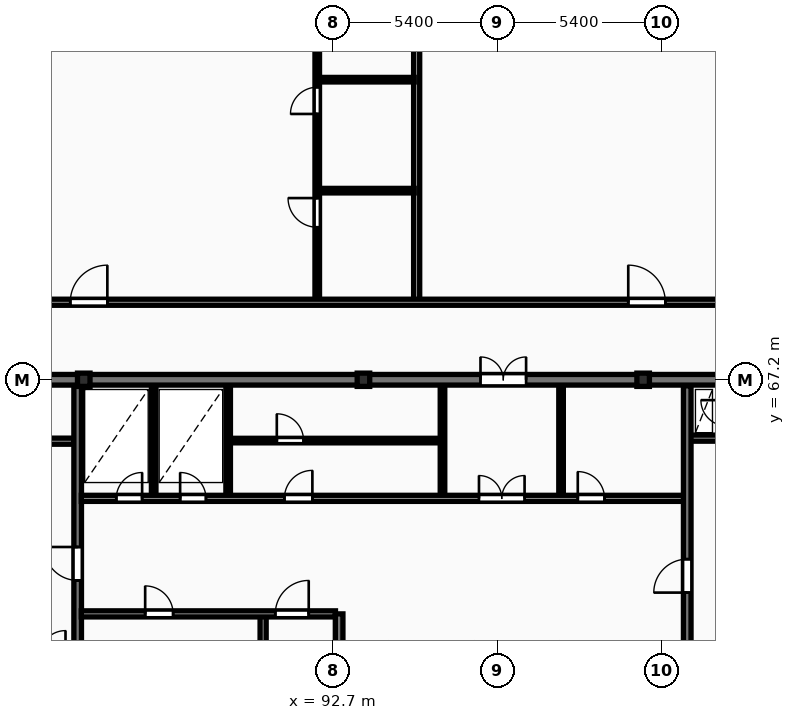
"""IFC4 building model, lengths in metres.
Left out: names, types, materials, properties, quantities, classifications, styles, units other than length and angle.
Written with IfcOpenShell. Run it as: python <this file> out.ifc"""

import sys

from ifc_helpers import new_model, si_unit, direction, frame, frame_2d, origin, origin_2d, place, context, subcontext, project, spatial, rectangle, i_section, extrude, element, fill, save


model = new_model("IFC4")
c1 = context("Model", 3, precision=1e-05, world=origin(), true_north=direction((0.0, 1.0)))
c2 = subcontext(c1, "Body", "Model", "MODEL_VIEW")
j1 = project(units=[si_unit("LENGTHUNIT", "METRE"), si_unit("PLANEANGLEUNIT", "RADIAN")], contexts=[c1])
p1 = place(None, origin())
s1 = spatial("IfcSite", under=j1, at=p1, CompositionType="ELEMENT")
p2 = place(p1, origin())
s2 = spatial("IfcBuilding", under=s1, at=p2, CompositionType="ELEMENT")
p3 = place(p2, frame((0.0, 0.0, 153.7)))
s3 = spatial("IfcBuildingStorey", under=s2, at=p3, CompositionType="ELEMENT", Elevation=153.7)
for number, where, z_axis, x_axis in (
    (1, (84.5, 67.2, 0.0), (0.0, 0.0, 1.0), (1.0, 0.0, 0.0)),
    (2, (93.7, 67.2, 0.0), (0.0, 0.0, 1.0), (1.0, 0.0, 0.0)),
    (3, (102.9, 67.2, 0.0), (0.0, 0.0, 1.0), (1.0, 0.0, 0.0)),
):
    element("IfcColumn", number, at=place(p3, frame(where, z_axis=z_axis, x_axis=x_axis)), inside=s3, PredefinedType="COLUMN", context=c2, shape_type="SweptSolid", body=[
        extrude(i_section(OverallWidth=0.412, OverallDepth=0.437, WebThickness=0.036, FlangeThickness=0.052, FilletRadius=0.015, at=origin_2d()), origin(), (0.0, 0.0, 1.0), 3.6),
    ])
p4 = place(p3, frame((75.95, 67.2, 0.0), z_axis=(0.0, 0.0, 1.0), x_axis=(1.0, 0.0, 0.0)))
e4 = element("IfcWall", 4, at=p4, inside=s3, PredefinedType="SHEAR", context=c2, shape_type="SweptSolid", body=[
    extrude(rectangle(XDim=36.3, YDim=0.35, at=frame_2d((18.15, 0.0))), origin(), (0.0, 0.0, 1.0), 3.6),
])
p5 = place(p4, frame((5.25, 0.0, 0.0)))
e5 = element("IfcOpeningElement", 5, at=p5, cuts=e4, PredefinedType="OPENING", context=c2, shape_type="SweptSolid", body=[
    extrude(rectangle(XDim=1.0, YDim=2.15, at=frame_2d((0.5, 1.075))), frame((0.0, 0.185, 0.0), z_axis=(0.0, -1.0, 0.0), x_axis=(1.0, 0.0, 0.0)), (0.0, 0.0, 1.0), 0.37),
])
p6 = place(p4, frame((21.6, 0.0, 0.0)))
e6 = element("IfcOpeningElement", 6, at=p6, cuts=e4, PredefinedType="OPENING", context=c2, shape_type="SweptSolid", body=[
    extrude(rectangle(XDim=1.5, YDim=2.2, at=frame_2d((0.75, 1.1))), frame((0.0, 0.185, 0.0), z_axis=(0.0, -1.0, 0.0), x_axis=(1.0, 0.0, 0.0)), (0.0, 0.0, 1.0), 0.37),
])
p7 = place(p4, frame((30.45, 0.0, 0.0)))
e7 = element("IfcOpeningElement", 7, at=p7, cuts=e4, PredefinedType="OPENING", context=c2, shape_type="SweptSolid", body=[
    extrude(rectangle(XDim=1.0, YDim=2.15, at=frame_2d((0.5, 1.075))), frame((0.0, 0.185, 0.0), z_axis=(0.0, -1.0, 0.0), x_axis=(1.0, 0.0, 0.0)), (0.0, 0.0, 1.0), 0.37),
])
p8 = place(p3, frame((79.79, 65.18, 0.0), z_axis=(0.0, 0.0, 1.0), x_axis=(1.0, 0.0, 0.0)))
e8 = element("IfcWall", 8, at=p8, inside=s3, PredefinedType="PARTITIONING", context=c2, shape_type="SweptSolid", body=[
    extrude(rectangle(XDim=4.39, YDim=0.2, at=frame_2d((2.195, 0.0))), origin(), (0.0, 0.0, 1.0), 3.32),
])
p9 = place(p8, frame((1.5, 0.0, 0.0)))
e9 = element("IfcOpeningElement", 9, at=p9, cuts=e8, PredefinedType="OPENING", context=c2, shape_type="SweptSolid", body=[
    extrude(rectangle(XDim=1.1, YDim=2.1, at=frame_2d((0.55, 1.05))), frame((0.0, 0.11, 0.0), z_axis=(0.0, -1.0, 0.0), x_axis=(1.0, 0.0, 0.0)), (0.0, 0.0, 1.0), 0.22),
])
p10 = place(p3, frame((84.3, 55.4, 0.0), z_axis=(0.0, 0.0, 1.0), x_axis=(0.0, 1.0, 0.0)))
e10 = element("IfcWall", 10, at=p10, inside=s3, PredefinedType="SHEAR", context=c2, shape_type="SweptSolid", body=[
    extrude(rectangle(XDim=11.6, YDim=0.25, at=frame_2d((5.8, 0.0))), origin(), (0.0, 0.0, 1.0), 3.6),
])
p11 = place(p10, frame((5.2, 0.0, 0.0)))
e11 = element("IfcOpeningElement", 11, at=p11, cuts=e10, PredefinedType="OPENING", context=c2, shape_type="SweptSolid", body=[
    extrude(rectangle(XDim=1.1, YDim=2.1, at=frame_2d((0.55, 1.05))), frame((0.0, 0.135, 0.0), z_axis=(0.0, -1.0, 0.0), x_axis=(1.0, 0.0, 0.0)), (0.0, 0.0, 1.0), 0.27),
])
p12 = place(p3, frame((90.4, 55.4, 0.0), z_axis=(0.0, 0.0, 1.0), x_axis=(0.0, 1.0, 0.0)))
e12 = element("IfcWall", 12, at=p12, inside=s3, PredefinedType="PARTITIONING", context=c2, shape_type="SweptSolid", body=[
    extrude(rectangle(XDim=4.1, YDim=0.2, at=frame_2d((2.05, 0.0))), origin(), (0.0, 0.0, 1.0), 3.32),
])
p13 = place(p3, frame((84.42, 59.5, 0.0), z_axis=(0.0, 0.0, 1.0), x_axis=(1.0, 0.0, 0.0)))
e13 = element("IfcWall", 13, at=p13, inside=s3, PredefinedType="PARTITIONING", context=c2, shape_type="SweptSolid", body=[
    extrude(rectangle(XDim=8.36, YDim=0.2, at=frame_2d((4.18, 0.0))), origin(), (0.0, 0.0, 1.0), 3.32),
])
p14 = place(p13, frame((2.1, 0.0, 0.0)))
e14 = element("IfcOpeningElement", 14, at=p14, cuts=e13, PredefinedType="OPENING", context=c2, shape_type="SweptSolid", body=[
    extrude(rectangle(XDim=0.92, YDim=2.08, at=frame_2d((0.46, 1.04))), frame((0.0, 0.11, 0.0), z_axis=(0.0, -1.0, 0.0), x_axis=(1.0, 0.0, 0.0)), (0.0, 0.0, 1.0), 0.22),
])
p15 = place(p13, frame((6.38, 0.0, 0.0)))
e15 = element("IfcOpeningElement", 15, at=p15, cuts=e13, PredefinedType="OPENING", context=c2, shape_type="SweptSolid", body=[
    extrude(rectangle(XDim=1.1, YDim=2.1, at=frame_2d((0.55, 1.05))), frame((0.0, 0.11, 0.0), z_axis=(0.0, -1.0, 0.0), x_axis=(1.0, 0.0, 0.0)), (0.0, 0.0, 1.0), 0.22),
])
p16 = place(p3, frame((92.9, 55.4, 0.0), z_axis=(0.0, 0.0, 1.0), x_axis=(0.0, 1.0, 0.0)))
e16 = element("IfcWall", 16, at=p16, inside=s3, PredefinedType="SHEAR", context=c2, shape_type="SweptSolid", body=[
    extrude(rectangle(XDim=4.1, YDim=0.25, at=frame_2d((2.05, 0.0))), origin(), (0.0, 0.0, 1.0), 3.6),
])
for number, where, z_axis, x_axis in (
    (17, (86.8, 63.4, 0.0), (0.0, 0.0, 1.0), (0.0, 1.0, 0.0)),
    (18, (89.25, 63.4, 0.0), (0.0, 0.0, 1.0), (0.0, 1.0, 0.0)),
):
    element("IfcWall", number, at=place(p3, frame(where, z_axis=z_axis, x_axis=x_axis)), inside=s3, PredefinedType="PARTITIONING", context=c2, shape_type="SweptSolid", body=[
        extrude(rectangle(XDim=3.6, YDim=0.15, at=frame_2d((1.8, 0.0))), origin(), (0.0, 0.0, 1.0), 3.32),
    ])
p17 = place(p3, frame((89.25, 65.2, 0.0), z_axis=(0.0, 0.0, 1.0), x_axis=(1.0, 0.0, 0.0)))
e19 = element("IfcWall", 19, at=p17, inside=s3, PredefinedType="PARTITIONING", context=c2, shape_type="SweptSolid", body=[
    extrude(rectangle(XDim=7.05, YDim=0.15, at=frame_2d((3.525, 0.0))), origin(), (0.0, 0.0, 1.0), 3.32),
])
p18 = place(p17, frame((1.6, 0.0, 0.0)))
e20 = element("IfcOpeningElement", 20, at=p18, cuts=e19, PredefinedType="OPENING", context=c2, shape_type="SweptSolid", body=[
    extrude(rectangle(XDim=0.88, YDim=2.06, at=frame_2d((0.44, 1.03))), frame((0.0, 0.085, 0.0), z_axis=(0.0, -1.0, 0.0), x_axis=(1.0, 0.0, 0.0)), (0.0, 0.0, 1.0), 0.17),
])
for number, where, z_axis, x_axis in (
    (21, (96.3, 63.4, 0.0), (0.0, 0.0, 1.0), (0.0, 1.0, 0.0)),
    (22, (100.2, 63.4, 0.0), (0.0, 0.0, 1.0), (0.0, 1.0, 0.0)),
):
    element("IfcWall", number, at=place(p3, frame(where, z_axis=z_axis, x_axis=x_axis)), inside=s3, PredefinedType="PARTITIONING", context=c2, shape_type="SweptSolid", body=[
        extrude(rectangle(XDim=3.6, YDim=0.15, at=frame_2d((1.8, 0.0))), origin(), (0.0, 0.0, 1.0), 3.32),
    ])
p19 = place(p3, frame((84.42, 63.3, 0.0), z_axis=(0.0, 0.0, 1.0), x_axis=(1.0, 0.0, 0.0)))
e23 = element("IfcWall", 23, at=p19, inside=s3, PredefinedType="PARTITIONING", context=c2, shape_type="SweptSolid", body=[
    extrude(rectangle(XDim=19.83, YDim=0.2, at=frame_2d((9.915, 0.0))), origin(), (0.0, 0.0, 1.0), 3.32),
])
p20 = place(p19, frame((1.15, 0.0, 0.0)))
e24 = element("IfcOpeningElement", 24, at=p20, cuts=e23, PredefinedType="OPENING", context=c2, shape_type="SweptSolid", body=[
    extrude(rectangle(XDim=0.85, YDim=2.05, at=frame_2d((0.425, 1.025))), frame((0.0, 0.11, 0.0), z_axis=(0.0, -1.0, 0.0), x_axis=(1.0, 0.0, 0.0)), (0.0, 0.0, 1.0), 0.22),
])
p21 = place(p19, frame((3.25, 0.0, 0.0)))
e25 = element("IfcOpeningElement", 25, at=p21, cuts=e23, PredefinedType="OPENING", context=c2, shape_type="SweptSolid", body=[
    extrude(rectangle(XDim=0.85, YDim=2.05, at=frame_2d((0.425, 1.025))), frame((0.0, 0.11, 0.0), z_axis=(0.0, -1.0, 0.0), x_axis=(1.0, 0.0, 0.0)), (0.0, 0.0, 1.0), 0.22),
])
p22 = place(p19, frame((13.08, 0.0, 0.0)))
e26 = element("IfcOpeningElement", 26, at=p22, cuts=e23, PredefinedType="OPENING", context=c2, shape_type="SweptSolid", body=[
    extrude(rectangle(XDim=1.5, YDim=2.2, at=frame_2d((0.75, 1.1))), frame((0.0, 0.11, 0.0), z_axis=(0.0, -1.0, 0.0), x_axis=(1.0, 0.0, 0.0)), (0.0, 0.0, 1.0), 0.22),
])
p23 = place(p19, frame((6.68, 0.0, 0.0)))
e27 = element("IfcOpeningElement", 27, at=p23, cuts=e23, PredefinedType="OPENING", context=c2, shape_type="SweptSolid", body=[
    extrude(rectangle(XDim=0.92, YDim=2.08, at=frame_2d((0.46, 1.04))), frame((0.0, 0.11, 0.0), z_axis=(0.0, -1.0, 0.0), x_axis=(1.0, 0.0, 0.0)), (0.0, 0.0, 1.0), 0.22),
])
p24 = place(p19, frame((16.33, 0.0, 0.0)))
e28 = element("IfcOpeningElement", 28, at=p24, cuts=e23, PredefinedType="OPENING", context=c2, shape_type="SweptSolid", body=[
    extrude(rectangle(XDim=0.88, YDim=2.06, at=frame_2d((0.44, 1.03))), frame((0.0, 0.11, 0.0), z_axis=(0.0, -1.0, 0.0), x_axis=(1.0, 0.0, 0.0)), (0.0, 0.0, 1.0), 0.22),
])
p25 = place(p3, frame((104.45, 65.28, 0.0), z_axis=(0.0, 0.0, 1.0), x_axis=(1.0, 0.0, 0.0)))
e29 = element("IfcWall", 29, at=p25, inside=s3, PredefinedType="PARTITIONING", context=c2, shape_type="SweptSolid", body=[
    extrude(rectangle(XDim=1.2, YDim=0.2, at=frame_2d((0.6, 0.0))), origin(), (0.0, 0.0, 1.0), 3.32),
])
p26 = place(p3, frame((104.35, 58.4, 0.0), z_axis=(0.0, 0.0, 1.0), x_axis=(0.0, 1.0, 0.0)))
e30 = element("IfcWall", 30, at=p26, inside=s3, PredefinedType="SHEAR", context=c2, shape_type="SweptSolid", body=[
    extrude(rectangle(XDim=8.6, YDim=0.25, at=frame_2d((4.3, 0.0))), origin(), (0.0, 0.0, 1.0), 3.6),
])
p27 = place(p26, frame((1.8, 0.0, 0.0)))
e31 = element("IfcOpeningElement", 31, at=p27, cuts=e30, PredefinedType="OPENING", context=c2, shape_type="SweptSolid", body=[
    extrude(rectangle(XDim=1.1, YDim=2.1, at=frame_2d((0.55, 1.05))), frame((0.0, 0.135, 0.0), z_axis=(0.0, -1.0, 0.0), x_axis=(1.0, 0.0, 0.0)), (0.0, 0.0, 1.0), 0.27),
])
p28 = place(p3, frame((95.45, 69.83, 0.0), z_axis=(0.0, 0.0, 1.0), x_axis=(0.0, 1.0, 0.0)))
e32 = element("IfcWall", 32, at=p28, inside=s3, PredefinedType="PARTITIONING", context=c2, shape_type="SweptSolid", body=[
    extrude(rectangle(XDim=26.07, YDim=0.2, at=frame_2d((13.035, 0.0))), origin(), (0.0, 0.0, 1.0), 3.32),
])
for number, where, z_axis, x_axis in (
    (33, (92.24, 73.42, 0.0), (0.0, 0.0, 1.0), (1.0, 0.0, 0.0)),
    (34, (92.24, 77.07, 0.0), (0.0, 0.0, 1.0), (1.0, 0.0, 0.0)),
):
    element("IfcWall", number, at=place(p3, frame(where, z_axis=z_axis, x_axis=x_axis)), inside=s3, PredefinedType="PARTITIONING", context=c2, shape_type="SweptSolid", body=[
        extrude(rectangle(XDim=3.13, YDim=0.15, at=frame_2d((1.565, 0.0))), origin(), (0.0, 0.0, 1.0), 3.32),
    ])
p29 = place(p3, frame((92.18, 69.81, 0.0), z_axis=(0.0, 0.0, 1.0), x_axis=(0.0, 1.0, 0.0)))
e35 = element("IfcWall", 35, at=p29, inside=s3, PredefinedType="PARTITIONING", context=c2, shape_type="SweptSolid", body=[
    extrude(rectangle(XDim=20.78, YDim=0.15, at=frame_2d((10.39, 0.0))), origin(), (0.0, 0.0, 1.0), 3.32),
])
p30 = place(p29, frame((2.406, 0.0, 0.0)))
e36 = element("IfcOpeningElement", 36, at=p30, cuts=e35, PredefinedType="OPENING", context=c2, shape_type="SweptSolid", body=[
    extrude(rectangle(XDim=0.96, YDim=2.1, at=frame_2d((0.48, 1.05))), frame((0.0, 0.085, 0.0), z_axis=(0.0, -1.0, 0.0), x_axis=(1.0, 0.0, 0.0)), (0.0, 0.0, 1.0), 0.17),
])
p31 = place(p29, frame((6.133, 0.0, 0.0)))
e37 = element("IfcOpeningElement", 37, at=p31, cuts=e35, PredefinedType="OPENING", context=c2, shape_type="SweptSolid", body=[
    extrude(rectangle(XDim=0.88, YDim=2.06, at=frame_2d((0.44, 1.03))), frame((0.0, 0.085, 0.0), z_axis=(0.0, -1.0, 0.0), x_axis=(1.0, 0.0, 0.0)), (0.0, 0.0, 1.0), 0.17),
])
p32 = place(p29, frame((11.37, 0.0, 0.0)))
e38 = element("IfcOpeningElement", 38, at=p32, cuts=e35, PredefinedType="OPENING", context=c2, shape_type="SweptSolid", body=[
    extrude(rectangle(XDim=0.84, YDim=2.04, at=frame_2d((0.42, 1.02))), frame((0.0, 0.085, 0.0), z_axis=(0.0, -1.0, 0.0), x_axis=(1.0, 0.0, 0.0)), (0.0, 0.0, 1.0), 0.17),
])
p33 = place(p3, frame((57.6, 69.75, 0.0), z_axis=(0.0, 0.0, 1.0), x_axis=(1.0, 0.0, 0.0)))
e39 = element("IfcWall", 39, at=p33, inside=s3, PredefinedType="PARTITIONING", context=c2, shape_type="SweptSolid", body=[
    extrude(rectangle(XDim=73.0, YDim=0.2, at=frame_2d((36.5, 0.0))), origin(), (0.0, 0.0, 1.0), 3.32),
])
p34 = place(p33, frame((7.416, 0.0, 0.0)))
e40 = element("IfcOpeningElement", 40, at=p34, cuts=e39, PredefinedType="OPENING", context=c2, shape_type="SweptSolid", body=[
    extrude(rectangle(XDim=1.22, YDim=2.18, at=frame_2d((0.61, 1.09))), frame((0.0, 0.11, 0.0), z_axis=(0.0, -1.0, 0.0), x_axis=(1.0, 0.0, 0.0)), (0.0, 0.0, 1.0), 0.22),
])
p35 = place(p33, frame((26.456, 0.0, 0.0)))
e41 = element("IfcOpeningElement", 41, at=p35, cuts=e39, PredefinedType="OPENING", context=c2, shape_type="SweptSolid", body=[
    extrude(rectangle(XDim=1.22, YDim=2.18, at=frame_2d((0.61, 1.09))), frame((0.0, 0.11, 0.0), z_axis=(0.0, -1.0, 0.0), x_axis=(1.0, 0.0, 0.0)), (0.0, 0.0, 1.0), 0.22),
])
p36 = place(p33, frame((44.81, 0.0, 0.0)))
e42 = element("IfcOpeningElement", 42, at=p36, cuts=e39, PredefinedType="OPENING", context=c2, shape_type="SweptSolid", body=[
    extrude(rectangle(XDim=1.22, YDim=2.18, at=frame_2d((0.61, 1.09))), frame((0.0, 0.11, 0.0), z_axis=(0.0, -1.0, 0.0), x_axis=(1.0, 0.0, 0.0)), (0.0, 0.0, 1.0), 0.22),
])
p37 = place(p33, frame((57.195, 0.0, 0.0)))
e43 = element("IfcOpeningElement", 43, at=p37, cuts=e39, PredefinedType="OPENING", context=c2, shape_type="SweptSolid", body=[
    extrude(rectangle(XDim=0.95, YDim=2.15, at=frame_2d((0.475, 1.075))), frame((0.0, 0.11, 0.0), z_axis=(0.0, -1.0, 0.0), x_axis=(1.0, 0.0, 0.0)), (0.0, 0.0, 1.0), 0.22),
])
p38 = place(p6, origin())
e44 = element("IfcDoor", 44, at=p38, inside=s3, OperationType="DOUBLE_DOOR_SINGLE_SWING", PredefinedType="DOOR", context=c2, shape_type="SweptSolid", body=[
    extrude(rectangle(XDim=1.5, YDim=2.2, at=frame_2d((0.75, 1.1))), frame((0.0, 0.025, 0.0), z_axis=(0.0, -1.0, 0.0), x_axis=(1.0, 0.0, 0.0)), (0.0, 0.0, 1.0), 0.05),
])
fill(e6, e44)
p39 = place(p11, origin())
e45 = element("IfcDoor", 45, at=p39, inside=s3, OperationType="SINGLE_SWING_RIGHT", PredefinedType="DOOR", context=c2, shape_type="SweptSolid", body=[
    extrude(rectangle(XDim=1.1, YDim=2.1, at=frame_2d((0.55, 1.05))), frame((0.0, 0.025, 0.0), z_axis=(0.0, -1.0, 0.0), x_axis=(1.0, 0.0, 0.0)), (0.0, 0.0, 1.0), 0.05),
])
fill(e11, e45)
p40 = place(p14, origin())
e46 = element("IfcDoor", 46, at=p40, inside=s3, OperationType="SINGLE_SWING_LEFT", PredefinedType="DOOR", context=c2, shape_type="SweptSolid", body=[
    extrude(rectangle(XDim=0.92, YDim=2.08, at=frame_2d((0.46, 1.04))), frame((0.0, 0.025, 0.0), z_axis=(0.0, -1.0, 0.0), x_axis=(1.0, 0.0, 0.0)), (0.0, 0.0, 1.0), 0.05),
])
fill(e14, e46)
p41 = place(p15, origin())
e47 = element("IfcDoor", 47, at=p41, inside=s3, OperationType="SINGLE_SWING_RIGHT", PredefinedType="DOOR", context=c2, shape_type="SweptSolid", body=[
    extrude(rectangle(XDim=1.1, YDim=2.1, at=frame_2d((0.55, 1.05))), frame((0.0, 0.025, 0.0), z_axis=(0.0, -1.0, 0.0), x_axis=(1.0, 0.0, 0.0)), (0.0, 0.0, 1.0), 0.05),
])
fill(e15, e47)
p42 = place(p18, origin())
e48 = element("IfcDoor", 48, at=p42, inside=s3, OperationType="SINGLE_SWING_LEFT", PredefinedType="DOOR", context=c2, shape_type="SweptSolid", body=[
    extrude(rectangle(XDim=0.88, YDim=2.06, at=frame_2d((0.44, 1.03))), frame((0.0, 0.025, 0.0), z_axis=(0.0, -1.0, 0.0), x_axis=(1.0, 0.0, 0.0)), (0.0, 0.0, 1.0), 0.05),
])
fill(e20, e48)
p43 = place(p20, origin())
e49 = element("IfcDoor", 49, at=p43, inside=s3, OperationType="SINGLE_SWING_RIGHT", PredefinedType="DOOR", context=c2, shape_type="SweptSolid", body=[
    extrude(rectangle(XDim=0.85, YDim=2.05, at=frame_2d((0.425, 1.025))), frame((0.0, 0.025, 0.0), z_axis=(0.0, -1.0, 0.0), x_axis=(1.0, 0.0, 0.0)), (0.0, 0.0, 1.0), 0.05),
])
fill(e24, e49)
p44 = place(p21, origin())
e50 = element("IfcDoor", 50, at=p44, inside=s3, OperationType="SINGLE_SWING_LEFT", PredefinedType="DOOR", context=c2, shape_type="SweptSolid", body=[
    extrude(rectangle(XDim=0.85, YDim=2.05, at=frame_2d((0.425, 1.025))), frame((0.0, 0.025, 0.0), z_axis=(0.0, -1.0, 0.0), x_axis=(1.0, 0.0, 0.0)), (0.0, 0.0, 1.0), 0.05),
])
fill(e25, e50)
p45 = place(p22, origin())
e51 = element("IfcDoor", 51, at=p45, inside=s3, OperationType="DOUBLE_DOOR_SINGLE_SWING", PredefinedType="DOOR", context=c2, shape_type="SweptSolid", body=[
    extrude(rectangle(XDim=1.5, YDim=2.2, at=frame_2d((0.75, 1.1))), frame((0.0, 0.025, 0.0), z_axis=(0.0, -1.0, 0.0), x_axis=(1.0, 0.0, 0.0)), (0.0, 0.0, 1.0), 0.05),
])
fill(e26, e51)
p46 = place(p23, origin())
e52 = element("IfcDoor", 52, at=p46, inside=s3, OperationType="SINGLE_SWING_RIGHT", PredefinedType="DOOR", context=c2, shape_type="SweptSolid", body=[
    extrude(rectangle(XDim=0.92, YDim=2.08, at=frame_2d((0.46, 1.04))), frame((0.0, 0.025, 0.0), z_axis=(0.0, -1.0, 0.0), x_axis=(1.0, 0.0, 0.0)), (0.0, 0.0, 1.0), 0.05),
])
fill(e27, e52)
p47 = place(p24, origin())
e53 = element("IfcDoor", 53, at=p47, inside=s3, OperationType="SINGLE_SWING_LEFT", PredefinedType="DOOR", context=c2, shape_type="SweptSolid", body=[
    extrude(rectangle(XDim=0.88, YDim=2.06, at=frame_2d((0.44, 1.03))), frame((0.0, 0.025, 0.0), z_axis=(0.0, -1.0, 0.0), x_axis=(1.0, 0.0, 0.0)), (0.0, 0.0, 1.0), 0.05),
])
fill(e28, e53)
p48 = place(p27, origin())
e54 = element("IfcDoor", 54, at=p48, inside=s3, OperationType="SINGLE_SWING_LEFT", PredefinedType="DOOR", context=c2, shape_type="SweptSolid", body=[
    extrude(rectangle(XDim=1.1, YDim=2.1, at=frame_2d((0.55, 1.05))), frame((0.0, 0.025, 0.0), z_axis=(0.0, -1.0, 0.0), x_axis=(1.0, 0.0, 0.0)), (0.0, 0.0, 1.0), 0.05),
])
fill(e31, e54)
p49 = place(p30, origin())
e55 = element("IfcDoor", 55, at=p49, inside=s3, OperationType="SINGLE_SWING_RIGHT", PredefinedType="DOOR", context=c2, shape_type="SweptSolid", body=[
    extrude(rectangle(XDim=0.96, YDim=2.1, at=frame_2d((0.48, 1.05))), frame((0.0, 0.025, 0.0), z_axis=(0.0, -1.0, 0.0), x_axis=(1.0, 0.0, 0.0)), (0.0, 0.0, 1.0), 0.05),
])
fill(e36, e55)
p50 = place(p31, origin())
e56 = element("IfcDoor", 56, at=p50, inside=s3, OperationType="SINGLE_SWING_LEFT", PredefinedType="DOOR", context=c2, shape_type="SweptSolid", body=[
    extrude(rectangle(XDim=0.88, YDim=2.06, at=frame_2d((0.44, 1.03))), frame((0.0, 0.025, 0.0), z_axis=(0.0, -1.0, 0.0), x_axis=(1.0, 0.0, 0.0)), (0.0, 0.0, 1.0), 0.05),
])
fill(e37, e56)
p51 = place(p35, origin())
e57 = element("IfcDoor", 57, at=p51, inside=s3, OperationType="SINGLE_SWING_RIGHT", PredefinedType="DOOR", context=c2, shape_type="SweptSolid", body=[
    extrude(rectangle(XDim=1.22, YDim=2.18, at=frame_2d((0.61, 1.09))), frame((0.0, 0.025, 0.0), z_axis=(0.0, -1.0, 0.0), x_axis=(1.0, 0.0, 0.0)), (0.0, 0.0, 1.0), 0.05),
])
fill(e41, e57)
p52 = place(p36, origin())
e58 = element("IfcDoor", 58, at=p52, inside=s3, OperationType="SINGLE_SWING_LEFT", PredefinedType="DOOR", context=c2, shape_type="SweptSolid", body=[
    extrude(rectangle(XDim=1.22, YDim=2.18, at=frame_2d((0.61, 1.09))), frame((0.0, 0.025, 0.0), z_axis=(0.0, -1.0, 0.0), x_axis=(1.0, 0.0, 0.0)), (0.0, 0.0, 1.0), 0.05),
])
fill(e42, e58)
save(model, sys.argv[1])
